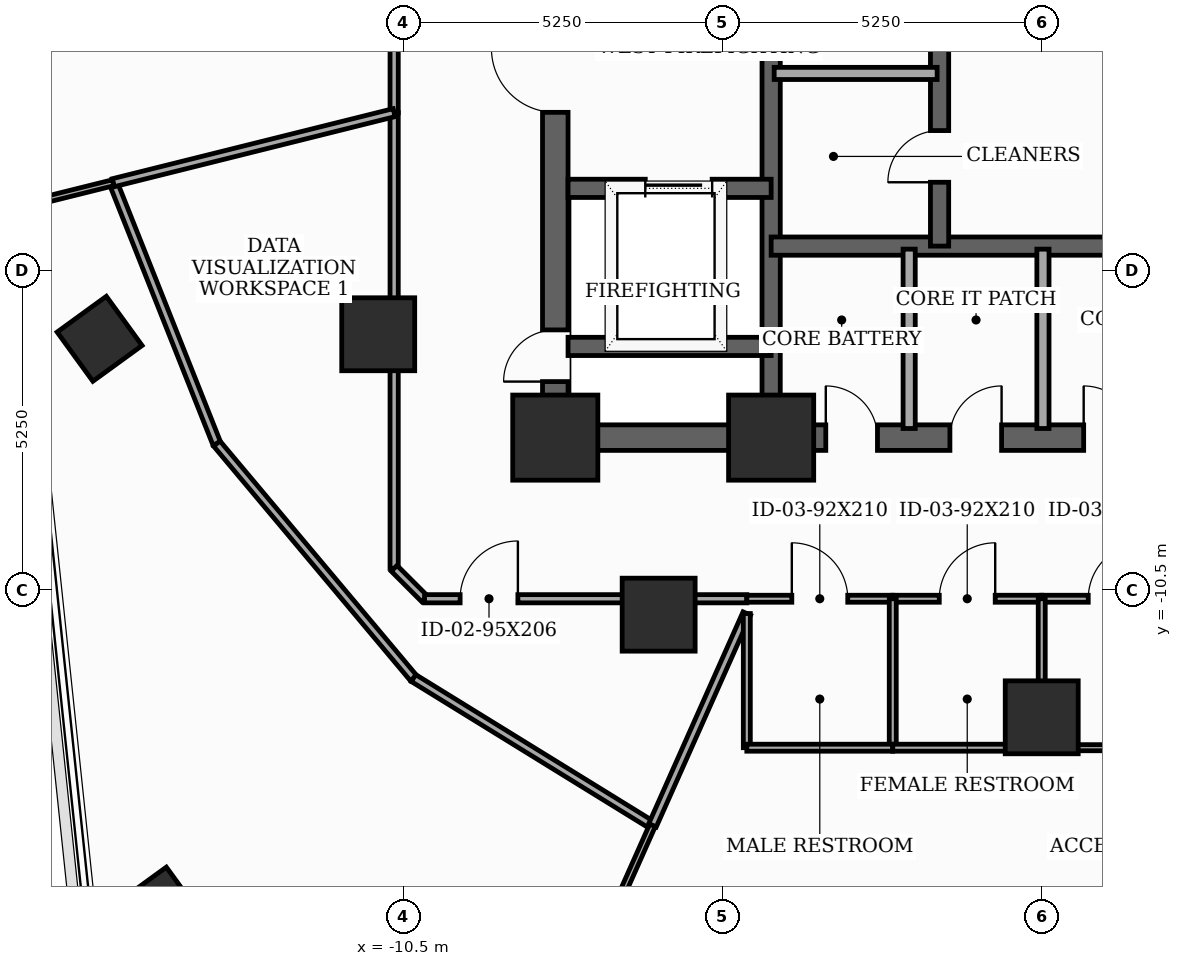
"""IFC4 building model, lengths in metres.
Left out: names, types, materials, properties, quantities, classifications, styles, units other than length and angle.
Written with IfcOpenShell. Run it as: python <this file> out.ifc"""

import sys

from ifc_helpers import new_model, si_unit, direction, frame, frame_2d, origin, origin_2d, place, context, subcontext, project, spatial, rectangle, extrude, element, fill, save


model = new_model("IFC4")
c1 = context("Model", 3, precision=1e-05, world=origin(), true_north=direction((0.0, 1.0)))
c2 = subcontext(c1, "Body", "Model", "MODEL_VIEW")
j1 = project(units=[si_unit("LENGTHUNIT", "METRE"), si_unit("PLANEANGLEUNIT", "RADIAN")], contexts=[c1])
p1 = place(None, origin())
s1 = spatial("IfcSite", under=j1, at=p1, CompositionType="ELEMENT")
p2 = place(p1, origin())
s2 = spatial("IfcBuilding", under=s1, at=p2, CompositionType="ELEMENT")
p3 = place(p2, frame((0.0, 0.0, 180.5)))
s3 = spatial("IfcBuildingStorey", under=s2, at=p3, CompositionType="ELEMENT", Elevation=180.5)
for number, where, z_axis, x_axis in (
    (1, (-8.0, -8.0, 0.0), (0.0, 0.0, 1.0), (1.0, 0.0, 0.0)),
    (2, (-4.45, -8.0, 0.0), (0.0, 0.0, 1.0), (1.0, 0.0, 0.0)),
):
    element("IfcColumn", number, at=place(p3, frame(where, z_axis=z_axis, x_axis=x_axis)), inside=s3, PredefinedType="COLUMN", context=c2, shape_type="SweptSolid", body=[
        extrude(rectangle(XDim=1.4, YDim=1.4, at=origin_2d()), origin(), (0.0, 0.0, 1.0), 3.7),
    ])
for number, where, z_axis, x_axis in (
    (3, (-10.912, -6.3, 0.0), (0.0, 0.0, 1.0), (1.0, 0.0, 0.0)),
    (4, (-6.3, -10.912, 0.0), (0.0, 0.0, 1.0), (1.0, 0.0, 0.0)),
    (5, (0.0, -12.6, 0.0), (0.0, 0.0, 1.0), (1.0, 0.0, 0.0)),
):
    element("IfcColumn", number, at=place(p3, frame(where, z_axis=z_axis, x_axis=x_axis)), inside=s3, PredefinedType="COLUMN", context=c2, shape_type="SweptSolid", body=[
        extrude(rectangle(XDim=1.2, YDim=1.2, at=origin_2d()), origin(), (0.0, 0.0, 1.0), 3.7),
    ])
for number, where, z_axis, x_axis in (
    (6, (-15.494, -6.375, 0.0), (0.0, 0.0, 1.0), (0.809, 0.588, 0.0)),
    (7, (-14.507, -15.763, 0.0), (0.0, 0.0, 1.0), (0.809, 0.588, 0.0)),
):
    element("IfcColumn", number, at=place(p3, frame(where, z_axis=z_axis, x_axis=x_axis)), inside=s3, PredefinedType="COLUMN", context=c2, shape_type="SweptSolid", body=[
        extrude(rectangle(XDim=1.0, YDim=1.0, at=origin_2d()), origin(), (0.0, 0.0, 1.0), 3.7),
    ])
p4 = place(p3, frame((-8.0, -8.0, 0.0), z_axis=(0.0, 0.0, 1.0), x_axis=(0.0, 1.0, 0.0)))
e8 = element("IfcWall", 8, at=p4, inside=s3, PredefinedType="SHEAR", context=c2, shape_type="SweptSolid", body=[
    extrude(rectangle(XDim=16.0, YDim=0.42, at=frame_2d((8.0, 0.0))), origin(), (0.0, 0.0, 1.0), 3.5),
])
p5 = place(p4, frame((0.922, 0.0, 0.0)))
e9 = element("IfcOpeningElement", 9, at=p5, cuts=e8, PredefinedType="OPENING", context=c2, shape_type="SweptSolid", body=[
    extrude(rectangle(XDim=0.85, YDim=2.02, at=frame_2d((0.425, 1.01))), frame((0.0, 0.22, 0.0), z_axis=(0.0, -1.0, 0.0), x_axis=(1.0, 0.0, 0.0)), (0.0, 0.0, 1.0), 0.44),
])
p6 = place(p4, frame((5.35, 0.0, 0.0)))
e10 = element("IfcOpeningElement", 10, at=p6, cuts=e8, PredefinedType="OPENING", context=c2, shape_type="SweptSolid", body=[
    extrude(rectangle(XDim=1.05, YDim=2.15, at=frame_2d((0.525, 1.075))), frame((0.0, 0.22, 0.0), z_axis=(0.0, -1.0, 0.0), x_axis=(1.0, 0.0, 0.0)), (0.0, 0.0, 1.0), 0.44),
])
p7 = place(p3, frame((-8.0, -8.0, 0.0), z_axis=(0.0, 0.0, 1.0), x_axis=(1.0, 0.0, 0.0)))
e11 = element("IfcWall", 11, at=p7, inside=s3, PredefinedType="SHEAR", context=c2, shape_type="SweptSolid", body=[
    extrude(rectangle(XDim=16.0, YDim=0.42, at=frame_2d((8.0, 0.0))), origin(), (0.0, 0.0, 1.0), 3.5),
])
p8 = place(p7, frame((4.449, 0.0, 0.0)))
e12 = element("IfcOpeningElement", 12, at=p8, cuts=e11, PredefinedType="OPENING", context=c2, shape_type="SweptSolid", body=[
    extrude(rectangle(XDim=0.85, YDim=2.02, at=frame_2d((0.425, 1.01))), frame((0.0, 0.22, 0.0), z_axis=(0.0, -1.0, 0.0), x_axis=(1.0, 0.0, 0.0)), (0.0, 0.0, 1.0), 0.44),
])
p9 = place(p7, frame((6.49, 0.0, 0.0)))
e13 = element("IfcOpeningElement", 13, at=p9, cuts=e11, PredefinedType="OPENING", context=c2, shape_type="SweptSolid", body=[
    extrude(rectangle(XDim=0.85, YDim=2.02, at=frame_2d((0.425, 1.01))), frame((0.0, 0.22, 0.0), z_axis=(0.0, -1.0, 0.0), x_axis=(1.0, 0.0, 0.0)), (0.0, 0.0, 1.0), 0.44),
])
p10 = place(p7, frame((8.69, 0.0, 0.0)))
e14 = element("IfcOpeningElement", 14, at=p10, cuts=e11, PredefinedType="OPENING", context=c2, shape_type="SweptSolid", body=[
    extrude(rectangle(XDim=0.85, YDim=2.02, at=frame_2d((0.425, 1.01))), frame((0.0, 0.22, 0.0), z_axis=(0.0, -1.0, 0.0), x_axis=(1.0, 0.0, 0.0)), (0.0, 0.0, 1.0), 0.44),
])
p11 = place(p7, frame((10.701, 0.0, 0.0)))
e15 = element("IfcOpeningElement", 15, at=p11, cuts=e11, PredefinedType="OPENING", context=c2, shape_type="SweptSolid", body=[
    extrude(rectangle(XDim=0.85, YDim=2.02, at=frame_2d((0.425, 1.01))), frame((0.0, 0.22, 0.0), z_axis=(0.0, -1.0, 0.0), x_axis=(1.0, 0.0, 0.0)), (0.0, 0.0, 1.0), 0.44),
])
p12 = place(p3, frame((-4.45, -7.79, 0.0), z_axis=(0.0, 0.0, 1.0), x_axis=(0.0, 1.0, 0.0)))
e16 = element("IfcWall", 16, at=p12, inside=s3, PredefinedType="SHEAR", context=c2, shape_type="SweptSolid", body=[
    extrude(rectangle(XDim=15.58, YDim=0.3, at=frame_2d((7.79, 0.0))), origin(), (0.0, 0.0, 1.0), 3.5),
])
p13 = place(p3, frame((-7.79, -3.9, 0.0), z_axis=(0.0, 0.0, 1.0), x_axis=(1.0, 0.0, 0.0)))
e17 = element("IfcWall", 17, at=p13, inside=s3, PredefinedType="SHEAR", context=c2, shape_type="SweptSolid", body=[
    extrude(rectangle(XDim=3.34, YDim=0.3, at=frame_2d((1.67, 0.0))), origin(), (0.0, 0.0, 1.0), 3.5),
])
p14 = place(p13, frame((1.27, 0.0, 0.0)))
e18 = element("IfcOpeningElement", 18, at=p14, cuts=e17, PredefinedType="OPENING", context=c2, shape_type="SweptSolid", body=[
    extrude(rectangle(XDim=1.1, YDim=2.1, at=frame_2d((0.55, 1.05))), frame((0.0, 0.16, 0.0), z_axis=(0.0, -1.0, 0.0), x_axis=(1.0, 0.0, 0.0)), (0.0, 0.0, 1.0), 0.32),
])
p15 = place(p3, frame((-7.79, -6.5, 0.0), z_axis=(0.0, 0.0, 1.0), x_axis=(1.0, 0.0, 0.0)))
e19 = element("IfcWall", 19, at=p15, inside=s3, PredefinedType="SHEAR", context=c2, shape_type="SweptSolid", body=[
    extrude(rectangle(XDim=3.34, YDim=0.3, at=frame_2d((1.67, 0.0))), origin(), (0.0, 0.0, 1.0), 3.5),
])
p16 = place(p3, frame((-4.45, -4.85, 0.0), z_axis=(0.0, 0.0, 1.0), x_axis=(1.0, 0.0, 0.0)))
e20 = element("IfcWall", 20, at=p16, inside=s3, PredefinedType="SHEAR", context=c2, shape_type="SweptSolid", body=[
    extrude(rectangle(XDim=8.9, YDim=0.3, at=frame_2d((4.45, 0.0))), origin(), (0.0, 0.0, 1.0), 3.5),
])
p17 = place(p3, frame((-1.68, -4.85, 0.0), z_axis=(0.0, 0.0, 1.0), x_axis=(0.0, 1.0, 0.0)))
e21 = element("IfcWall", 21, at=p17, inside=s3, PredefinedType="SHEAR", context=c2, shape_type="SweptSolid", body=[
    extrude(rectangle(XDim=12.64, YDim=0.3, at=frame_2d((6.32, 0.0))), origin(), (0.0, 0.0, 1.0), 3.5),
])
p18 = place(p17, frame((1.05, 0.0, 0.0)))
e22 = element("IfcOpeningElement", 22, at=p18, cuts=e21, PredefinedType="OPENING", context=c2, shape_type="SweptSolid", body=[
    extrude(rectangle(XDim=0.85, YDim=2.02, at=frame_2d((0.425, 1.01))), frame((0.0, 0.16, 0.0), z_axis=(0.0, -1.0, 0.0), x_axis=(1.0, 0.0, 0.0)), (0.0, 0.0, 1.0), 0.32),
])
p19 = place(p17, frame((6.8, 0.0, 0.0)))
e23 = element("IfcOpeningElement", 23, at=p19, cuts=e21, PredefinedType="OPENING", context=c2, shape_type="SweptSolid", body=[
    extrude(rectangle(XDim=0.95, YDim=2.1, at=frame_2d((0.475, 1.05))), frame((0.0, 0.16, 0.0), z_axis=(0.0, -1.0, 0.0), x_axis=(1.0, 0.0, 0.0)), (0.0, 0.0, 1.0), 0.32),
])
for number, where, z_axis, x_axis in (
    (24, (-2.18, -7.85, 0.0), (0.0, 0.0, 1.0), (0.0, 1.0, 0.0)),
    (25, (0.02, -7.85, 0.0), (0.0, 0.0, 1.0), (0.0, 1.0, 0.0)),
):
    element("IfcWall", number, at=place(p3, frame(where, z_axis=z_axis, x_axis=x_axis)), inside=s3, PredefinedType="SOLIDWALL", context=c2, shape_type="SweptSolid", body=[
        extrude(rectangle(XDim=2.95, YDim=0.2, at=frame_2d((1.475, 0.0))), origin(), (0.0, 0.0, 1.0), 2.885),
    ])
p20 = place(p3, frame((-4.4, -2.01, 0.0), z_axis=(0.0, 0.0, 1.0), x_axis=(1.0, 0.0, 0.0)))
e26 = element("IfcWall", 26, at=p20, inside=s3, PredefinedType="SOLIDWALL", context=c2, shape_type="SweptSolid", body=[
    extrude(rectangle(XDim=2.68, YDim=0.2, at=frame_2d((1.34, 0.0))), origin(), (0.0, 0.0, 1.0), 3.5),
])
p21 = place(p3, frame((-10.65, -2.655, 0.0), z_axis=(0.0, 0.0, 1.0), x_axis=(0.0, -1.0, 0.0)))
e27 = element("IfcWall", 27, at=p21, inside=s3, PredefinedType="PARTITIONING", context=c2, shape_type="SweptSolid", body=[
    extrude(rectangle(XDim=7.495, YDim=0.135, at=frame_2d((3.748, 0.0))), origin(), (0.0, 0.0, 1.0), 2.085),
])
p22 = place(p3, frame((-10.65, -10.15, 0.0), z_axis=(0.0, 0.0, 1.0), x_axis=(0.707106781187, -0.707106781187, 0.0)))
e28 = element("IfcWall", 28, at=p22, inside=s3, PredefinedType="PARTITIONING", context=c2, shape_type="SweptSolid", body=[
    extrude(rectangle(XDim=0.707, YDim=0.135, at=frame_2d((0.354, 0.0))), origin(), (0.0, 0.0, 1.0), 3.5),
])
p23 = place(p3, frame((-10.15, -10.65, 0.0), z_axis=(0.0, 0.0, 1.0), x_axis=(1.0, 0.0, 0.0)))
e29 = element("IfcWall", 29, at=p23, inside=s3, PredefinedType="PARTITIONING", context=c2, shape_type="SweptSolid", body=[
    extrude(rectangle(XDim=5.3, YDim=0.135, at=frame_2d((2.65, 0.0))), origin(), (0.0, 0.0, 1.0), 2.085),
])
p24 = place(p23, frame((0.585, 0.0, 0.0)))
e30 = element("IfcOpeningElement", 30, at=p24, cuts=e29, PredefinedType="OPENING", context=c2, shape_type="SweptSolid", body=[
    extrude(rectangle(XDim=0.95, YDim=2.035, at=frame_2d((0.475, 1.018))), frame((0.0, 0.077, 0.0), z_axis=(0.0, -1.0, 0.0), x_axis=(1.0, 0.0, 0.0)), (0.0, 0.0, 1.0), 0.155),
])
p25 = place(p3, frame((-4.85, -10.65, 0.0), z_axis=(0.0, 0.0, 1.0), x_axis=(1.0, 0.0, 0.0)))
e31 = element("IfcWall", 31, at=p25, inside=s3, PredefinedType="PARTITIONING", context=c2, shape_type="SweptSolid", body=[
    extrude(rectangle(XDim=2.4, YDim=0.115, at=frame_2d((1.2, 0.0))), origin(), (0.0, 0.0, 1.0), 3.5),
])
p26 = place(p25, frame((0.74, 0.0, 0.0)))
e32 = element("IfcOpeningElement", 32, at=p26, cuts=e31, PredefinedType="OPENING", context=c2, shape_type="SweptSolid", body=[
    extrude(rectangle(XDim=0.92, YDim=2.1, at=frame_2d((0.46, 1.05))), frame((0.0, 0.067, 0.0), z_axis=(0.0, -1.0, 0.0), x_axis=(1.0, 0.0, 0.0)), (0.0, 0.0, 1.0), 0.135),
])
p27 = place(p3, frame((-2.45, -10.65, 0.0), z_axis=(0.0, 0.0, 1.0), x_axis=(1.0, 0.0, 0.0)))
e33 = element("IfcWall", 33, at=p27, inside=s3, PredefinedType="PARTITIONING", context=c2, shape_type="SweptSolid", body=[
    extrude(rectangle(XDim=2.45, YDim=0.115, at=frame_2d((1.225, 0.0))), origin(), (0.0, 0.0, 1.0), 2.885),
])
p28 = place(p27, frame((0.765, 0.0, 0.0)))
e34 = element("IfcOpeningElement", 34, at=p28, cuts=e33, PredefinedType="OPENING", context=c2, shape_type="SweptSolid", body=[
    extrude(rectangle(XDim=0.92, YDim=2.1, at=frame_2d((0.46, 1.05))), frame((0.0, 0.067, 0.0), z_axis=(0.0, -1.0, 0.0), x_axis=(1.0, 0.0, 0.0)), (0.0, 0.0, 1.0), 0.135),
])
p29 = place(p3, frame((0.0, -10.65, 0.0), z_axis=(0.0, 0.0, 1.0), x_axis=(1.0, 0.0, 0.0)))
e35 = element("IfcWall", 35, at=p29, inside=s3, PredefinedType="PARTITIONING", context=c2, shape_type="SweptSolid", body=[
    extrude(rectangle(XDim=2.45, YDim=0.115, at=frame_2d((1.225, 0.0))), origin(), (0.0, 0.0, 1.0), 3.5),
])
p30 = place(p29, frame((0.765, 0.0, 0.0)))
e36 = element("IfcOpeningElement", 36, at=p30, cuts=e35, PredefinedType="OPENING", context=c2, shape_type="SweptSolid", body=[
    extrude(rectangle(XDim=0.92, YDim=2.1, at=frame_2d((0.46, 1.05))), frame((0.0, 0.067, 0.0), z_axis=(0.0, -1.0, 0.0), x_axis=(1.0, 0.0, 0.0)), (0.0, 0.0, 1.0), 0.135),
])
p31 = place(p3, frame((-10.65, 10.15, 0.0), z_axis=(0.0, 0.0, 1.0), x_axis=(0.0, -1.0, 0.0)))
e37 = element("IfcWall", 37, at=p31, inside=s3, PredefinedType="PARTITIONING", context=c2, shape_type="SweptSolid", body=[
    extrude(rectangle(XDim=12.805, YDim=0.135, at=frame_2d((6.402, 0.0))), origin(), (0.0, 0.0, 1.0), 2.085),
])
p32 = place(p31, frame((5.927, 0.0, 0.0)))
e38 = element("IfcOpeningElement", 38, at=p32, cuts=e37, PredefinedType="OPENING", context=c2, shape_type="SweptSolid", body=[
    extrude(rectangle(XDim=0.95, YDim=2.035, at=frame_2d((0.475, 1.018))), frame((0.0, 0.077, 0.0), z_axis=(0.0, -1.0, 0.0), x_axis=(1.0, 0.0, 0.0)), (0.0, 0.0, 1.0), 0.155),
])
p33 = place(p3, frame((-15.271, -3.808, 0.0), z_axis=(0.0, 0.0, 1.0), x_axis=(0.369182774414, -0.929356809345, 0.0)))
e39 = element("IfcWall", 39, at=p33, inside=s3, PredefinedType="PARTITIONING", context=c2, shape_type="SweptSolid", body=[
    extrude(rectangle(XDim=4.616, YDim=0.135, at=frame_2d((2.308, 0.0))), origin(), (0.0, 0.0, 1.0), 2.085),
])
p34 = place(p3, frame((-13.567, -8.098, 0.0), z_axis=(0.0, 0.0, 1.0), x_axis=(0.642704085781, -0.766114520239, 0.0)))
e40 = element("IfcWall", 40, at=p34, inside=s3, PredefinedType="PARTITIONING", context=c2, shape_type="SweptSolid", body=[
    extrude(rectangle(XDim=5.035, YDim=0.135, at=frame_2d((2.517, 0.0))), origin(), (0.0, 0.0, 1.0), 2.085),
])
p35 = place(p3, frame((-10.331, -11.955, 0.0), z_axis=(0.0, 0.0, 1.0), x_axis=(0.851171263557, -0.524888064347, 0.0)))
e41 = element("IfcWall", 41, at=p35, inside=s3, PredefinedType="PARTITIONING", context=c2, shape_type="SweptSolid", body=[
    extrude(rectangle(XDim=4.616, YDim=0.135, at=frame_2d((2.308, 0.0))), origin(), (0.0, 0.0, 1.0), 2.085),
])
p36 = place(p3, frame((-6.402, -14.378, 0.0), z_axis=(0.0, 0.0, 1.0), x_axis=(0.406833086098, 0.913502512343, 0.0)))
e42 = element("IfcWall", 42, at=p36, inside=s3, PredefinedType="PARTITIONING", context=c2, shape_type="SweptSolid", body=[
    extrude(rectangle(XDim=3.815, YDim=0.135, at=frame_2d((1.907, 0.0))), origin(), (0.0, 0.0, 1.0), 2.885),
])
p37 = place(p3, frame((-10.65, -2.655, 0.0), z_axis=(0.0, 0.0, 1.0), x_axis=(-0.970250953753, -0.242101397643, 0.0)))
e43 = element("IfcWall", 43, at=p37, inside=s3, PredefinedType="PARTITIONING", context=c2, shape_type="SweptSolid", body=[
    extrude(rectangle(XDim=4.763, YDim=0.135, at=frame_2d((2.381, 0.0))), origin(), (0.0, 0.0, 1.0), 2.885),
])
p38 = place(p3, frame((-12.555, -28.199, 0.0), z_axis=(0.0, 0.0, 1.0), x_axis=(0.406672919663, 0.913573826471, 0.0)))
e44 = element("IfcWall", 44, at=p38, inside=s3, PredefinedType="MOVABLE", context=c2, shape_type="SweptSolid", body=[
    extrude(rectangle(XDim=15.129, YDim=0.1, at=frame_2d((7.564, 0.0))), origin(), (0.0, 0.0, 1.0), 2.085),
])
p39 = place(p38, frame((7.104, 0.0, 0.0)))
e45 = element("IfcOpeningElement", 45, at=p39, cuts=e44, PredefinedType="OPENING", context=c2, shape_type="SweptSolid", body=[
    extrude(rectangle(XDim=0.92, YDim=2.035, at=frame_2d((0.46, 1.018))), frame((0.0, 0.06, 0.0), z_axis=(0.0, -1.0, 0.0), x_axis=(1.0, 0.0, 0.0)), (0.0, 0.0, 1.0), 0.12),
])
p40 = place(p3, frame((-15.271, -3.808, 0.0), z_axis=(0.0, 0.0, 1.0), x_axis=(-0.970407499575, -0.24147315538, 0.0)))
e46 = element("IfcWall", 46, at=p40, inside=s3, PredefinedType="MOVABLE", context=c2, shape_type="SweptSolid", body=[
    extrude(rectangle(XDim=1.676, YDim=0.1, at=frame_2d((0.838, 0.0))), origin(), (0.0, 0.0, 1.0), 2.085),
])
p41 = place(p3, frame((-2.45, -13.1, 0.0), z_axis=(0.0, 0.0, 1.0), x_axis=(0.0, 1.0, 0.0)))
e47 = element("IfcWall", 47, at=p41, inside=s3, PredefinedType="PARTITIONING", context=c2, shape_type="SweptSolid", body=[
    extrude(rectangle(XDim=2.45, YDim=0.115, at=frame_2d((1.225, 0.0))), origin(), (0.0, 0.0, 1.0), 2.885),
])
p42 = place(p3, frame((-4.85, -10.893, 0.0), z_axis=(0.0, 0.0, 1.0), x_axis=(0.0, -1.0, 0.0)))
e48 = element("IfcWall", 48, at=p42, inside=s3, PredefinedType="PARTITIONING", context=c2, shape_type="SweptSolid", body=[
    extrude(rectangle(XDim=2.207, YDim=0.115, at=frame_2d((1.104, 0.0))), origin(), (0.0, 0.0, 1.0), 2.885),
])
p43 = place(p3, frame((-4.85, -13.1, 0.0), z_axis=(0.0, 0.0, 1.0), x_axis=(1.0, 0.0, 0.0)))
e49 = element("IfcWall", 49, at=p43, inside=s3, PredefinedType="PARTITIONING", context=c2, shape_type="SweptSolid", body=[
    extrude(rectangle(XDim=2.4, YDim=0.115, at=frame_2d((1.2, 0.0))), origin(), (0.0, 0.0, 1.0), 3.5),
])
p44 = place(p3, frame((-2.45, -13.1, 0.0), z_axis=(0.0, 0.0, 1.0), x_axis=(1.0, 0.0, 0.0)))
e50 = element("IfcWall", 50, at=p44, inside=s3, PredefinedType="PARTITIONING", context=c2, shape_type="SweptSolid", body=[
    extrude(rectangle(XDim=2.45, YDim=0.115, at=frame_2d((1.225, 0.0))), origin(), (0.0, 0.0, 1.0), 2.085),
])
p45 = place(p3, frame((0.0, -13.1, 0.0), z_axis=(0.0, 0.0, 1.0), x_axis=(0.0, 1.0, 0.0)))
e51 = element("IfcWall", 51, at=p45, inside=s3, PredefinedType="PARTITIONING", context=c2, shape_type="SweptSolid", body=[
    extrude(rectangle(XDim=2.45, YDim=0.115, at=frame_2d((1.225, 0.0))), origin(), (0.0, 0.0, 1.0), 2.085),
])
p46 = place(p3, frame((2.45, -13.1, 0.0), z_axis=(0.0, 0.0, 1.0), x_axis=(-1.0, 0.0, 0.0)))
e52 = element("IfcWall", 52, at=p46, inside=s3, PredefinedType="MOVABLE", context=c2, shape_type="SweptSolid", body=[
    extrude(rectangle(XDim=2.45, YDim=0.1, at=frame_2d((1.225, 0.0))), origin(), (0.0, 0.0, 1.0), 2.085),
])
p47 = place(p5, origin())
e53 = element("IfcDoor", 53, at=p47, inside=s3, OperationType="SINGLE_SWING_LEFT", PredefinedType="TRAPDOOR", context=c2, shape_type="SweptSolid", body=[
    extrude(rectangle(XDim=0.85, YDim=2.02, at=frame_2d((0.425, 1.01))), frame((0.0, 0.025, 0.0), z_axis=(0.0, -1.0, 0.0), x_axis=(1.0, 0.0, 0.0)), (0.0, 0.0, 1.0), 0.05),
])
fill(e9, e53)
p48 = place(p6, origin())
e54 = element("IfcDoor", 54, at=p48, inside=s3, OperationType="SINGLE_SWING_RIGHT", PredefinedType="DOOR", context=c2, shape_type="SweptSolid", body=[
    extrude(rectangle(XDim=1.05, YDim=2.15, at=frame_2d((0.525, 1.075))), frame((0.0, 0.025, 0.0), z_axis=(0.0, -1.0, 0.0), x_axis=(1.0, 0.0, 0.0)), (0.0, 0.0, 1.0), 0.05),
])
fill(e10, e54)
p49 = place(p8, origin())
e55 = element("IfcDoor", 55, at=p49, inside=s3, OperationType="SINGLE_SWING_LEFT", PredefinedType="TRAPDOOR", context=c2, shape_type="SweptSolid", body=[
    extrude(rectangle(XDim=0.85, YDim=2.02, at=frame_2d((0.425, 1.01))), frame((0.0, 0.025, 0.0), z_axis=(0.0, -1.0, 0.0), x_axis=(1.0, 0.0, 0.0)), (0.0, 0.0, 1.0), 0.05),
])
fill(e12, e55)
p50 = place(p9, origin())
e56 = element("IfcDoor", 56, at=p50, inside=s3, OperationType="SINGLE_SWING_RIGHT", PredefinedType="TRAPDOOR", context=c2, shape_type="SweptSolid", body=[
    extrude(rectangle(XDim=0.85, YDim=2.02, at=frame_2d((0.425, 1.01))), frame((0.0, 0.025, 0.0), z_axis=(0.0, -1.0, 0.0), x_axis=(1.0, 0.0, 0.0)), (0.0, 0.0, 1.0), 0.05),
])
fill(e13, e56)
p51 = place(p10, origin())
e57 = element("IfcDoor", 57, at=p51, inside=s3, OperationType="SINGLE_SWING_LEFT", PredefinedType="TRAPDOOR", context=c2, shape_type="SweptSolid", body=[
    extrude(rectangle(XDim=0.85, YDim=2.02, at=frame_2d((0.425, 1.01))), frame((0.0, 0.025, 0.0), z_axis=(0.0, -1.0, 0.0), x_axis=(1.0, 0.0, 0.0)), (0.0, 0.0, 1.0), 0.05),
])
fill(e14, e57)
p52 = place(p14, origin())
e58 = element("IfcDoor", 58, at=p52, inside=s3, OperationType="SLIDING_TO_LEFT", PredefinedType="DOOR", context=c2, shape_type="SweptSolid", body=[
    extrude(rectangle(XDim=1.1, YDim=2.1, at=frame_2d((0.55, 1.05))), frame((0.0, 0.025, 0.0), z_axis=(0.0, -1.0, 0.0), x_axis=(1.0, 0.0, 0.0)), (0.0, 0.0, 1.0), 0.05),
])
fill(e18, e58)
p53 = place(p18, origin())
e59 = element("IfcDoor", 59, at=p53, inside=s3, OperationType="SINGLE_SWING_LEFT", PredefinedType="TRAPDOOR", context=c2, shape_type="SweptSolid", body=[
    extrude(rectangle(XDim=0.85, YDim=2.02, at=frame_2d((0.425, 1.01))), frame((0.0, 0.025, 0.0), z_axis=(0.0, -1.0, 0.0), x_axis=(1.0, 0.0, 0.0)), (0.0, 0.0, 1.0), 0.05),
])
fill(e22, e59)
p54 = place(p24, origin())
e60 = element("IfcDoor", 60, at=p54, inside=s3, OperationType="SINGLE_SWING_RIGHT", PredefinedType="DOOR", context=c2, shape_type="SweptSolid", body=[
    extrude(rectangle(XDim=0.95, YDim=2.035, at=frame_2d((0.475, 1.018))), frame((0.0, 0.025, 0.0), z_axis=(0.0, -1.0, 0.0), x_axis=(1.0, 0.0, 0.0)), (0.0, 0.0, 1.0), 0.05),
])
fill(e30, e60)
p55 = place(p26, origin())
e61 = element("IfcDoor", 61, at=p55, inside=s3, OperationType="SINGLE_SWING_LEFT", PredefinedType="DOOR", context=c2, shape_type="SweptSolid", body=[
    extrude(rectangle(XDim=0.92, YDim=2.1, at=frame_2d((0.46, 1.05))), frame((0.0, 0.025, 0.0), z_axis=(0.0, -1.0, 0.0), x_axis=(1.0, 0.0, 0.0)), (0.0, 0.0, 1.0), 0.05),
])
fill(e32, e61)
p56 = place(p28, origin())
e62 = element("IfcDoor", 62, at=p56, inside=s3, OperationType="SINGLE_SWING_RIGHT", PredefinedType="DOOR", context=c2, shape_type="SweptSolid", body=[
    extrude(rectangle(XDim=0.92, YDim=2.1, at=frame_2d((0.46, 1.05))), frame((0.0, 0.025, 0.0), z_axis=(0.0, -1.0, 0.0), x_axis=(1.0, 0.0, 0.0)), (0.0, 0.0, 1.0), 0.05),
])
fill(e34, e62)
p57 = place(p30, origin())
e63 = element("IfcDoor", 63, at=p57, inside=s3, OperationType="SINGLE_SWING_RIGHT", PredefinedType="DOOR", context=c2, shape_type="SweptSolid", body=[
    extrude(rectangle(XDim=0.92, YDim=2.1, at=frame_2d((0.46, 1.05))), frame((0.0, 0.025, 0.0), z_axis=(0.0, -1.0, 0.0), x_axis=(1.0, 0.0, 0.0)), (0.0, 0.0, 1.0), 0.05),
])
fill(e36, e63)
save(model, sys.argv[1])
